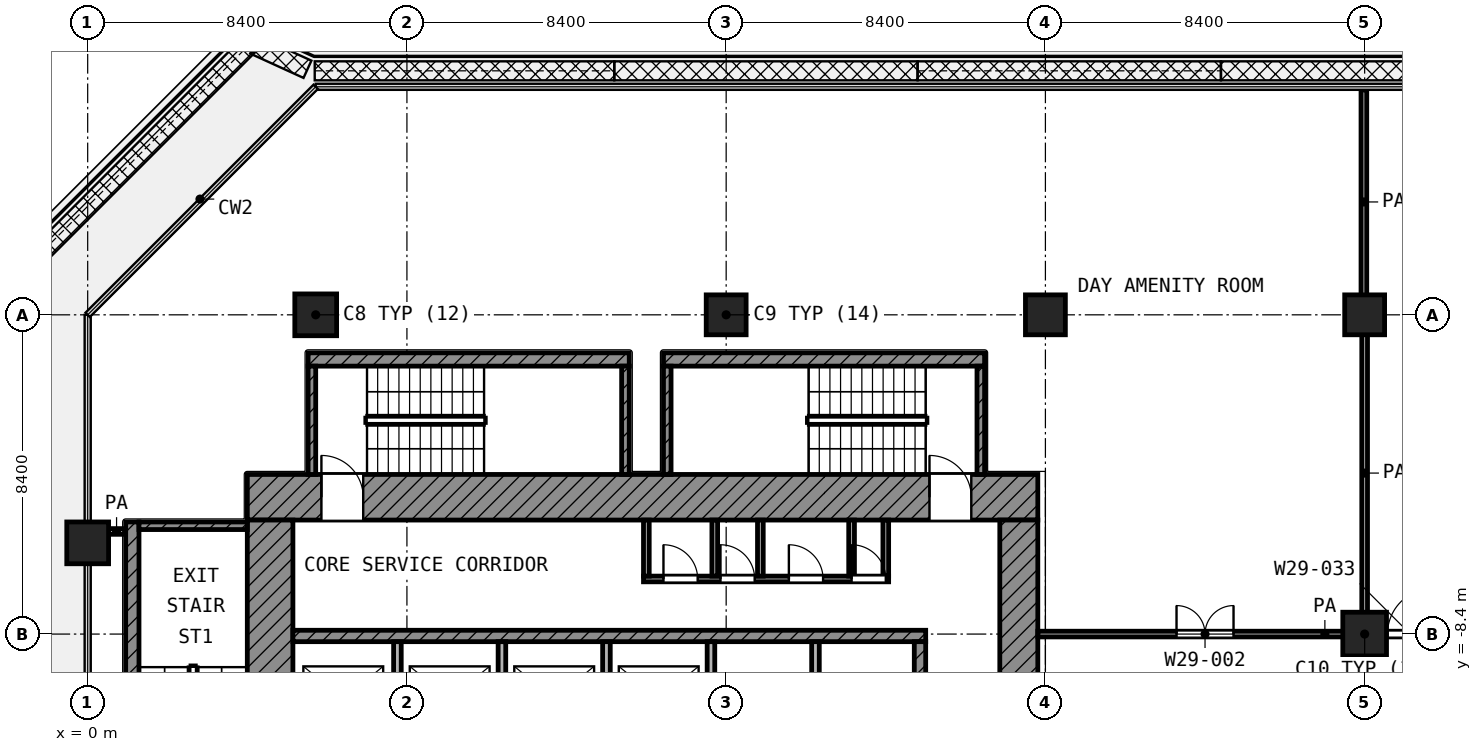
"""IFC4 building model, lengths in metres.
Left out: names, types, materials, properties, quantities, classifications, styles, units other than length and angle.
Written with IfcOpenShell. Run it as: python <this file> out.ifc"""

import sys

from ifc_helpers import new_model, si_unit, direction, frame, frame_2d, origin, origin_2d, place, context, subcontext, project, spatial, rectangle, extrude, element, fill, save


model = new_model("IFC4")
c1 = context("Model", 3, precision=1e-05, world=origin(), true_north=direction((0.0, 1.0)))
c2 = subcontext(c1, "Body", "Model", "MODEL_VIEW")
j1 = project(units=[si_unit("LENGTHUNIT", "METRE"), si_unit("PLANEANGLEUNIT", "RADIAN")], contexts=[c1])
p1 = place(None, origin())
s1 = spatial("IfcSite", under=j1, at=p1, CompositionType="ELEMENT")
p2 = place(p1, origin())
s2 = spatial("IfcBuilding", under=s1, at=p2, CompositionType="ELEMENT")
p3 = place(p2, frame((0.0, 0.0, 149.2)))
s3 = spatial("IfcBuildingStorey", under=s2, at=p3, CompositionType="ELEMENT", Elevation=149.2)
p4 = place(p3, frame((6.0, 0.0, 0.0), z_axis=(0.0, 0.0, 1.0), x_axis=(1.0, 0.0, 0.0)))
e1 = element("IfcColumn", 1, at=p4, inside=s3, PredefinedType="COLUMN", context=c2, shape_type="SweptSolid", body=[
    extrude(rectangle(XDim=1.1, YDim=1.1, at=origin_2d()), origin(), (0.0, 0.0, 1.0), 4.2),
])
for number, where, z_axis, x_axis in (
    (2, (16.8, 0.0, 0.0), (0.0, 0.0, 1.0), (1.0, 0.0, 0.0)),
    (3, (25.2, 0.0, 0.0), (0.0, 0.0, 1.0), (1.0, 0.0, 0.0)),
    (4, (33.6, 0.0, 0.0), (0.0, 0.0, 1.0), (1.0, 0.0, 0.0)),
):
    element("IfcColumn", number, at=place(p3, frame(where, z_axis=z_axis, x_axis=x_axis)), inside=s3, PredefinedType="COLUMN", context=c2, shape_type="SweptSolid", body=[
        extrude(rectangle(XDim=1.05, YDim=1.05, at=origin_2d()), origin(), (0.0, 0.0, 1.0), 4.2),
    ])
p5 = place(p3, frame((0.0, -6.0, 0.0), z_axis=(0.0, 0.0, 1.0), x_axis=(1.0, 0.0, 0.0)))
e5 = element("IfcColumn", 5, at=p5, inside=s3, PredefinedType="COLUMN", context=c2, shape_type="SweptSolid", body=[
    extrude(rectangle(XDim=1.1, YDim=1.1, at=origin_2d()), origin(), (0.0, 0.0, 1.0), 4.2),
])
p6 = place(p3, frame((33.6, -8.4, 0.0), z_axis=(0.0, 0.0, 1.0), x_axis=(1.0, 0.0, 0.0)))
e6 = element("IfcColumn", 6, at=p6, inside=s3, PredefinedType="COLUMN", context=c2, shape_type="SweptSolid", body=[
    extrude(rectangle(XDim=1.15, YDim=1.15, at=origin_2d()), origin(), (0.0, 0.0, 1.0), 4.2),
])
p7 = place(p3, frame((4.2, -4.8, 0.0), z_axis=(0.0, 0.0, 1.0), x_axis=(1.0, 0.0, 0.0)))
e7 = element("IfcWall", 7, at=p7, inside=s3, PredefinedType="SHEAR", context=c2, shape_type="SweptSolid", body=[
    extrude(rectangle(XDim=20.8, YDim=1.2, at=frame_2d((10.4, 0.0))), origin(), (0.0, 0.0, 1.0), 3.7),
])
p8 = place(p7, frame((1.95, 0.0, 0.0)))
e8 = element("IfcOpeningElement", 8, at=p8, cuts=e7, PredefinedType="OPENING", context=c2, shape_type="SweptSolid", body=[
    extrude(rectangle(XDim=1.1, YDim=2.1, at=frame_2d((0.55, 1.05))), frame((0.0, 0.61, 0.0), z_axis=(0.0, -1.0, 0.0), x_axis=(1.0, 0.0, 0.0)), (0.0, 0.0, 1.0), 1.22),
])
p9 = place(p7, frame((17.95, 0.0, 0.0)))
e9 = element("IfcOpeningElement", 9, at=p9, cuts=e7, PredefinedType="OPENING", context=c2, shape_type="SweptSolid", body=[
    extrude(rectangle(XDim=1.1, YDim=2.1, at=frame_2d((0.55, 1.05))), frame((0.0, 0.61, 0.0), z_axis=(0.0, -1.0, 0.0), x_axis=(1.0, 0.0, 0.0)), (0.0, 0.0, 1.0), 1.22),
])
p10 = place(p3, frame((4.8, -25.0, 0.0), z_axis=(0.0, 0.0, 1.0), x_axis=(0.0, 1.0, 0.0)))
e10 = element("IfcWall", 10, at=p10, inside=s3, PredefinedType="SHEAR", context=c2, shape_type="SweptSolid", body=[
    extrude(rectangle(XDim=19.6, YDim=1.2, at=frame_2d((9.8, 0.0))), origin(), (0.0, 0.0, 1.0), 3.7),
])
p11 = place(p10, frame((11.45, 0.0, 0.0)))
e11 = element("IfcOpeningElement", 11, at=p11, cuts=e10, PredefinedType="OPENING", context=c2, shape_type="SweptSolid", body=[
    extrude(rectangle(XDim=1.1, YDim=2.1, at=frame_2d((0.55, 1.05))), frame((0.0, 0.61, 0.0), z_axis=(0.0, -1.0, 0.0), x_axis=(1.0, 0.0, 0.0)), (0.0, 0.0, 1.0), 1.22),
])
p12 = place(p10, frame((2.15, 0.0, 0.0)))
e12 = element("IfcOpeningElement", 12, at=p12, cuts=e10, PredefinedType="OPENING", context=c2, shape_type="SweptSolid", body=[
    extrude(rectangle(XDim=1.1, YDim=2.1, at=frame_2d((0.55, 1.05))), frame((0.0, 0.61, 0.0), z_axis=(0.0, -1.0, 0.0), x_axis=(1.0, 0.0, 0.0)), (0.0, 0.0, 1.0), 1.22),
])
p13 = place(p3, frame((24.5, -24.0, 0.0), z_axis=(0.0, 0.0, 1.0), x_axis=(0.0, 1.0, 0.0)))
e13 = element("IfcWall", 13, at=p13, inside=s3, PredefinedType="SHEAR", context=c2, shape_type="SweptSolid", body=[
    extrude(rectangle(XDim=18.6, YDim=1.0, at=frame_2d((9.3, 0.0))), origin(), (0.0, 0.0, 1.0), 3.7),
])
p14 = place(p13, frame((10.5, 0.0, 0.0)))
e14 = element("IfcOpeningElement", 14, at=p14, cuts=e13, PredefinedType="OPENING", context=c2, shape_type="SweptSolid", body=[
    extrude(rectangle(XDim=1.8, YDim=2.1, at=frame_2d((0.9, 1.05))), frame((0.0, 0.51, 0.0), z_axis=(0.0, -1.0, 0.0), x_axis=(1.0, 0.0, 0.0)), (0.0, 0.0, 1.0), 1.02),
])
p15 = place(p3, frame((5.4, -8.45, 0.0), z_axis=(0.0, 0.0, 1.0), x_axis=(1.0, 0.0, 0.0)))
e15 = element("IfcWall", 15, at=p15, inside=s3, PredefinedType="SHEAR", context=c2, shape_type="SweptSolid", body=[
    extrude(rectangle(XDim=16.65, YDim=0.3, at=frame_2d((8.325, 0.0))), origin(), (0.0, 0.0, 1.0), 3.7),
])
p16 = place(p3, frame((21.9, -10.95, 0.0), z_axis=(0.0, 0.0, 1.0), x_axis=(0.0, 1.0, 0.0)))
e16 = element("IfcWall", 16, at=p16, inside=s3, PredefinedType="SHEAR", context=c2, shape_type="SweptSolid", body=[
    extrude(rectangle(XDim=2.35, YDim=0.3, at=frame_2d((1.175, 0.0))), origin(), (0.0, 0.0, 1.0), 3.7),
])
for number, where, z_axis, x_axis in (
    (17, (8.15, -10.95, 0.0), (0.0, 0.0, 1.0), (0.0, 1.0, 0.0)),
    (18, (10.9, -10.95, 0.0), (0.0, 0.0, 1.0), (0.0, 1.0, 0.0)),
    (19, (13.65, -10.95, 0.0), (0.0, 0.0, 1.0), (0.0, 1.0, 0.0)),
    (20, (16.4, -10.95, 0.0), (0.0, 0.0, 1.0), (0.0, 1.0, 0.0)),
    (21, (19.15, -10.95, 0.0), (0.0, 0.0, 1.0), (0.0, 1.0, 0.0)),
):
    element("IfcWall", number, at=place(p3, frame(where, z_axis=z_axis, x_axis=x_axis)), inside=s3, PredefinedType="PARTITIONING", context=c2, shape_type="SweptSolid", body=[
        extrude(rectangle(XDim=2.35, YDim=0.2, at=frame_2d((1.175, 0.0))), origin(), (0.0, 0.0, 1.0), 3.7),
    ])
p17 = place(p3, frame((14.625, -6.95, 0.0), z_axis=(0.0, 0.0, 1.0), x_axis=(1.0, 0.0, 0.0)))
e22 = element("IfcWall", 22, at=p17, inside=s3, PredefinedType="PARTITIONING", context=c2, shape_type="SweptSolid", body=[
    extrude(rectangle(XDim=6.45, YDim=0.15, at=frame_2d((3.225, 0.0))), origin(), (0.0, 0.0, 1.0), 3.7),
])
p18 = place(p17, frame((0.525, 0.0, 0.0)))
e23 = element("IfcOpeningElement", 23, at=p18, cuts=e22, PredefinedType="OPENING", context=c2, shape_type="SweptSolid", body=[
    extrude(rectangle(XDim=0.9, YDim=2.1, at=frame_2d((0.45, 1.05))), frame((0.0, 0.085, 0.0), z_axis=(0.0, -1.0, 0.0), x_axis=(1.0, 0.0, 0.0)), (0.0, 0.0, 1.0), 0.17),
])
p19 = place(p17, frame((2.025, 0.0, 0.0)))
e24 = element("IfcOpeningElement", 24, at=p19, cuts=e22, PredefinedType="OPENING", context=c2, shape_type="SweptSolid", body=[
    extrude(rectangle(XDim=0.9, YDim=2.1, at=frame_2d((0.45, 1.05))), frame((0.0, 0.085, 0.0), z_axis=(0.0, -1.0, 0.0), x_axis=(1.0, 0.0, 0.0)), (0.0, 0.0, 1.0), 0.17),
])
p20 = place(p17, frame((3.825, 0.0, 0.0)))
e25 = element("IfcOpeningElement", 25, at=p20, cuts=e22, PredefinedType="OPENING", context=c2, shape_type="SweptSolid", body=[
    extrude(rectangle(XDim=0.9, YDim=2.1, at=frame_2d((0.45, 1.05))), frame((0.0, 0.085, 0.0), z_axis=(0.0, -1.0, 0.0), x_axis=(1.0, 0.0, 0.0)), (0.0, 0.0, 1.0), 0.17),
])
p21 = place(p17, frame((5.475, 0.0, 0.0)))
e26 = element("IfcOpeningElement", 26, at=p21, cuts=e22, PredefinedType="OPENING", context=c2, shape_type="SweptSolid", body=[
    extrude(rectangle(XDim=0.9, YDim=2.1, at=frame_2d((0.45, 1.05))), frame((0.0, 0.085, 0.0), z_axis=(0.0, -1.0, 0.0), x_axis=(1.0, 0.0, 0.0)), (0.0, 0.0, 1.0), 0.17),
])
for number, where, z_axis, x_axis in (
    (27, (14.7, -6.875, 0.0), (0.0, 0.0, 1.0), (0.0, 1.0, 0.0)),
    (28, (16.5, -6.875, 0.0), (0.0, 0.0, 1.0), (0.0, 1.0, 0.0)),
    (29, (17.7, -6.875, 0.0), (0.0, 0.0, 1.0), (0.0, 1.0, 0.0)),
    (30, (20.1, -6.875, 0.0), (0.0, 0.0, 1.0), (0.0, 1.0, 0.0)),
    (31, (21.0, -6.875, 0.0), (0.0, 0.0, 1.0), (0.0, 1.0, 0.0)),
):
    element("IfcWall", number, at=place(p3, frame(where, z_axis=z_axis, x_axis=x_axis)), inside=s3, PredefinedType="PARTITIONING", context=c2, shape_type="SweptSolid", body=[
        extrude(rectangle(XDim=1.475, YDim=0.15, at=frame_2d((0.738, 0.0))), origin(), (0.0, 0.0, 1.0), 3.7),
    ])
p22 = place(p3, frame((1.175, -13.9, 0.0), z_axis=(0.0, 0.0, 1.0), x_axis=(0.0, 1.0, 0.0)))
e32 = element("IfcWall", 32, at=p22, inside=s3, PredefinedType="SHEAR", context=c2, shape_type="SweptSolid", body=[
    extrude(rectangle(XDim=8.45, YDim=0.35, at=frame_2d((4.225, 0.0))), origin(), (0.0, 0.0, 1.0), 3.7),
])
p23 = place(p3, frame((1.35, -5.55, 0.0), z_axis=(0.0, 0.0, 1.0), x_axis=(1.0, 0.0, 0.0)))
e33 = element("IfcWall", 33, at=p23, inside=s3, PredefinedType="SHEAR", context=c2, shape_type="SweptSolid", body=[
    extrude(rectangle(XDim=2.85, YDim=0.2, at=frame_2d((1.425, 0.0))), origin(), (0.0, 0.0, 1.0), 3.7),
])
p24 = place(p3, frame((5.8, -1.175, 0.0), z_axis=(0.0, 0.0, 1.0), x_axis=(1.0, 0.0, 0.0)))
e34 = element("IfcWall", 34, at=p24, inside=s3, PredefinedType="SHEAR", context=c2, shape_type="SweptSolid", body=[
    extrude(rectangle(XDim=8.45, YDim=0.35, at=frame_2d((4.225, 0.0))), origin(), (0.0, 0.0, 1.0), 3.7),
])
for number, where, z_axis, x_axis in (
    (35, (5.9, -4.2, 0.0), (0.0, 0.0, 1.0), (0.0, 1.0, 0.0)),
    (36, (14.15, -4.2, 0.0), (0.0, 0.0, 1.0), (0.0, 1.0, 0.0)),
):
    element("IfcWall", number, at=place(p3, frame(where, z_axis=z_axis, x_axis=x_axis)), inside=s3, PredefinedType="SHEAR", context=c2, shape_type="SweptSolid", body=[
        extrude(rectangle(XDim=2.85, YDim=0.2, at=frame_2d((1.425, 0.0))), origin(), (0.0, 0.0, 1.0), 3.7),
    ])
p25 = place(p3, frame((15.15, -1.175, 0.0), z_axis=(0.0, 0.0, 1.0), x_axis=(1.0, 0.0, 0.0)))
e37 = element("IfcWall", 37, at=p25, inside=s3, PredefinedType="SHEAR", context=c2, shape_type="SweptSolid", body=[
    extrude(rectangle(XDim=8.45, YDim=0.35, at=frame_2d((4.225, 0.0))), origin(), (0.0, 0.0, 1.0), 3.7),
])
for number, where, z_axis, x_axis in (
    (38, (15.25, -4.2, 0.0), (0.0, 0.0, 1.0), (0.0, 1.0, 0.0)),
    (39, (23.5, -4.2, 0.0), (0.0, 0.0, 1.0), (0.0, 1.0, 0.0)),
):
    element("IfcWall", number, at=place(p3, frame(where, z_axis=z_axis, x_axis=x_axis)), inside=s3, PredefinedType="SHEAR", context=c2, shape_type="SweptSolid", body=[
        extrude(rectangle(XDim=2.85, YDim=0.2, at=frame_2d((1.425, 0.0))), origin(), (0.0, 0.0, 1.0), 3.7),
    ])
p26 = place(p3, frame((25.0, -8.4, 0.0), z_axis=(0.0, 0.0, 1.0), x_axis=(1.0, 0.0, 0.0)))
e40 = element("IfcWall", 40, at=p26, inside=s3, PredefinedType="PARTITIONING", context=c2, shape_type="SweptSolid", body=[
    extrude(rectangle(XDim=15.107, YDim=0.15, at=frame_2d((7.553, 0.0))), origin(), (0.0, 0.0, 1.0), 3.7),
])
p27 = place(p26, frame((3.65, 0.0, 0.0)))
e41 = element("IfcOpeningElement", 41, at=p27, cuts=e40, PredefinedType="OPENING", context=c2, shape_type="SweptSolid", body=[
    extrude(rectangle(XDim=1.5, YDim=2.1, at=frame_2d((0.75, 1.05))), frame((0.0, 0.085, 0.0), z_axis=(0.0, -1.0, 0.0), x_axis=(1.0, 0.0, 0.0)), (0.0, 0.0, 1.0), 0.17),
])
p28 = place(p26, frame((9.2, 0.0, 0.0)))
e42 = element("IfcOpeningElement", 42, at=p28, cuts=e40, PredefinedType="OPENING", context=c2, shape_type="SweptSolid", body=[
    extrude(rectangle(XDim=1.2, YDim=2.1, at=frame_2d((0.6, 1.05))), frame((0.0, 0.085, 0.0), z_axis=(0.0, -1.0, 0.0), x_axis=(1.0, 0.0, 0.0)), (0.0, 0.0, 1.0), 0.17),
])
p29 = place(p3, frame((0.55, -5.7, 0.0), z_axis=(0.0, 0.0, 1.0), x_axis=(1.0, 0.0, 0.0)))
e43 = element("IfcWall", 43, at=p29, inside=s3, PredefinedType="PARTITIONING", context=c2, shape_type="SweptSolid", body=[
    extrude(rectangle(XDim=0.42, YDim=0.15, at=frame_2d((0.21, 0.0))), origin(), (0.0, 0.0, 1.0), 3.7),
])
p30 = place(p3, frame((33.58, 0.02, 0.0), z_axis=(0.0, 0.0, 1.0), x_axis=(0.0, 1.0, 0.0)))
e44 = element("IfcWall", 44, at=p30, inside=s3, PredefinedType="PARTITIONING", context=c2, shape_type="SweptSolid", body=[
    extrude(rectangle(XDim=5.9, YDim=0.15, at=frame_2d((2.95, 0.0))), origin(), (0.0, 0.0, 1.0), 3.7),
])
p31 = place(p3, frame((33.6, -8.325, 0.0), z_axis=(0.0, 0.0, 1.0), x_axis=(0.0, 1.0, 0.0)))
e45 = element("IfcWall", 45, at=p31, inside=s3, PredefinedType="PARTITIONING", context=c2, shape_type="SweptSolid", body=[
    extrude(rectangle(XDim=8.322, YDim=0.15, at=frame_2d((4.161, 0.0))), origin(), (0.0, 0.0, 1.0), 3.7),
])
p32 = place(p8, origin())
e46 = element("IfcDoor", 46, at=p32, inside=s3, OperationType="SINGLE_SWING_LEFT", PredefinedType="DOOR", context=c2, shape_type="SweptSolid", body=[
    extrude(rectangle(XDim=1.1, YDim=2.1, at=frame_2d((0.55, 1.05))), frame((0.0, 0.025, 0.0), z_axis=(0.0, -1.0, 0.0), x_axis=(1.0, 0.0, 0.0)), (0.0, 0.0, 1.0), 0.05),
])
fill(e8, e46)
p33 = place(p9, origin())
e47 = element("IfcDoor", 47, at=p33, inside=s3, OperationType="SINGLE_SWING_LEFT", PredefinedType="DOOR", context=c2, shape_type="SweptSolid", body=[
    extrude(rectangle(XDim=1.1, YDim=2.1, at=frame_2d((0.55, 1.05))), frame((0.0, 0.025, 0.0), z_axis=(0.0, -1.0, 0.0), x_axis=(1.0, 0.0, 0.0)), (0.0, 0.0, 1.0), 0.05),
])
fill(e9, e47)
p34 = place(p18, origin())
e48 = element("IfcDoor", 48, at=p34, inside=s3, OperationType="SINGLE_SWING_LEFT", PredefinedType="DOOR", context=c2, shape_type="SweptSolid", body=[
    extrude(rectangle(XDim=0.9, YDim=2.1, at=frame_2d((0.45, 1.05))), frame((0.0, 0.025, 0.0), z_axis=(0.0, -1.0, 0.0), x_axis=(1.0, 0.0, 0.0)), (0.0, 0.0, 1.0), 0.05),
])
fill(e23, e48)
p35 = place(p19, origin())
e49 = element("IfcDoor", 49, at=p35, inside=s3, OperationType="SINGLE_SWING_LEFT", PredefinedType="DOOR", context=c2, shape_type="SweptSolid", body=[
    extrude(rectangle(XDim=0.9, YDim=2.1, at=frame_2d((0.45, 1.05))), frame((0.0, 0.025, 0.0), z_axis=(0.0, -1.0, 0.0), x_axis=(1.0, 0.0, 0.0)), (0.0, 0.0, 1.0), 0.05),
])
fill(e24, e49)
p36 = place(p20, origin())
e50 = element("IfcDoor", 50, at=p36, inside=s3, OperationType="SINGLE_SWING_LEFT", PredefinedType="DOOR", context=c2, shape_type="SweptSolid", body=[
    extrude(rectangle(XDim=0.9, YDim=2.1, at=frame_2d((0.45, 1.05))), frame((0.0, 0.025, 0.0), z_axis=(0.0, -1.0, 0.0), x_axis=(1.0, 0.0, 0.0)), (0.0, 0.0, 1.0), 0.05),
])
fill(e25, e50)
p37 = place(p21, origin())
e51 = element("IfcDoor", 51, at=p37, inside=s3, OperationType="SINGLE_SWING_LEFT", PredefinedType="DOOR", context=c2, shape_type="SweptSolid", body=[
    extrude(rectangle(XDim=0.9, YDim=2.1, at=frame_2d((0.45, 1.05))), frame((0.0, 0.025, 0.0), z_axis=(0.0, -1.0, 0.0), x_axis=(1.0, 0.0, 0.0)), (0.0, 0.0, 1.0), 0.05),
])
fill(e26, e51)
p38 = place(p27, origin())
e52 = element("IfcDoor", 52, at=p38, inside=s3, OperationType="DOUBLE_DOOR_SINGLE_SWING", PredefinedType="DOOR", context=c2, shape_type="SweptSolid", body=[
    extrude(rectangle(XDim=1.5, YDim=2.1, at=frame_2d((0.75, 1.05))), frame((0.0, 0.025, 0.0), z_axis=(0.0, -1.0, 0.0), x_axis=(1.0, 0.0, 0.0)), (0.0, 0.0, 1.0), 0.05),
])
fill(e41, e52)
p39 = place(p28, origin())
e53 = element("IfcDoor", 53, at=p39, inside=s3, OperationType="SINGLE_SWING_RIGHT", PredefinedType="DOOR", context=c2, shape_type="SweptSolid", body=[
    extrude(rectangle(XDim=1.2, YDim=2.1, at=frame_2d((0.6, 1.05))), frame((0.0, 0.025, 0.0), z_axis=(0.0, -1.0, 0.0), x_axis=(1.0, 0.0, 0.0)), (0.0, 0.0, 1.0), 0.05),
])
fill(e42, e53)
save(model, sys.argv[1])
